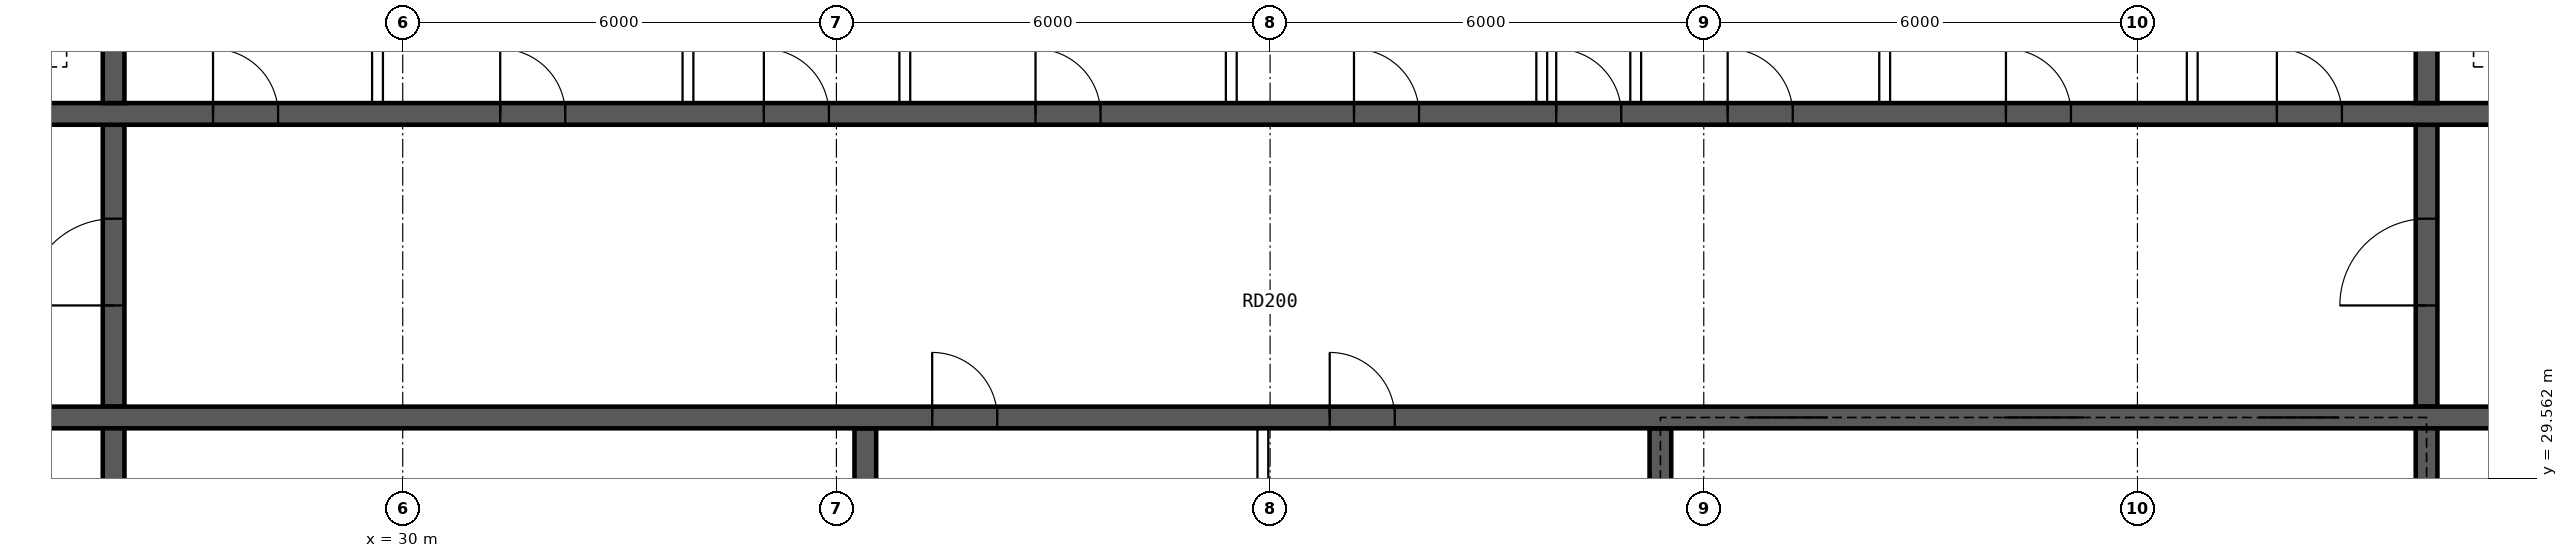
"""IFC4 building model, lengths in metres.
Left out: names, types, materials, properties, quantities, classifications, styles, units other than length and angle.
Written with IfcOpenShell. Run it as: python <this file> out.ifc"""

import sys

from ifc_helpers import new_model, si_unit, direction, frame, frame_2d, origin, place, context, subcontext, project, spatial, rectangle, extrude, element, fill, save


model = new_model("IFC4")
c1 = context("Model", 3, precision=1e-05, world=origin(), true_north=direction((0.0, 1.0)))
c2 = subcontext(c1, "Body", "Model", "MODEL_VIEW")
j1 = project(units=[si_unit("LENGTHUNIT", "METRE"), si_unit("PLANEANGLEUNIT", "RADIAN")], contexts=[c1])
p1 = place(None, origin())
s1 = spatial("IfcSite", under=j1, at=p1, CompositionType="ELEMENT")
p2 = place(p1, origin())
s2 = spatial("IfcBuilding", under=s1, at=p2, CompositionType="ELEMENT")
p3 = place(p2, frame((0.0, 0.0, 262.3)))
s3 = spatial("IfcBuildingStorey", under=s2, at=p3, CompositionType="ELEMENT", Elevation=262.3)
p4 = place(p3, frame((18.3, 30.4, 0.0), z_axis=(0.0, 0.0, 1.0), x_axis=(1.0, 0.0, 0.0)))
e1 = element("IfcWall", 1, at=p4, inside=s3, PredefinedType="SHEAR", context=c2, shape_type="SweptSolid", body=[
    extrude(rectangle(XDim=47.4, YDim=0.3, at=frame_2d((23.7, 0.0))), origin(), (0.0, 0.0, 1.0), 6.0),
])
p5 = place(p4, frame((0.4, 0.0, 0.0)))
e2 = element("IfcOpeningElement", 2, at=p5, cuts=e1, PredefinedType="OPENING", context=c2, shape_type="SweptSolid", body=[
    extrude(rectangle(XDim=1.0, YDim=2.1, at=frame_2d((0.5, 1.05))), frame((0.0, 0.16, 0.0), z_axis=(0.0, -1.0, 0.0), x_axis=(1.0, 0.0, 0.0)), (0.0, 0.0, 1.0), 0.32),
])
p6 = place(p4, frame((46.0, 0.0, 0.0)))
e3 = element("IfcOpeningElement", 3, at=p6, cuts=e1, PredefinedType="OPENING", context=c2, shape_type="SweptSolid", body=[
    extrude(rectangle(XDim=1.0, YDim=2.1, at=frame_2d((0.5, 1.05))), frame((0.0, 0.16, 0.0), z_axis=(0.0, -1.0, 0.0), x_axis=(1.0, 0.0, 0.0)), (0.0, 0.0, 1.0), 0.32),
])
p7 = place(p4, frame((19.025, 0.0, 0.0)))
e4 = element("IfcOpeningElement", 4, at=p7, cuts=e1, PredefinedType="OPENING", context=c2, shape_type="SweptSolid", body=[
    extrude(rectangle(XDim=0.9, YDim=2.1, at=frame_2d((0.45, 1.05))), frame((0.0, 0.16, 0.0), z_axis=(0.0, -1.0, 0.0), x_axis=(1.0, 0.0, 0.0)), (0.0, 0.0, 1.0), 0.32),
])
p8 = place(p4, frame((24.525, 0.0, 0.0)))
e5 = element("IfcOpeningElement", 5, at=p8, cuts=e1, PredefinedType="OPENING", context=c2, shape_type="SweptSolid", body=[
    extrude(rectangle(XDim=0.9, YDim=2.1, at=frame_2d((0.45, 1.05))), frame((0.0, 0.16, 0.0), z_axis=(0.0, -1.0, 0.0), x_axis=(1.0, 0.0, 0.0)), (0.0, 0.0, 1.0), 0.32),
])
p9 = place(p4, frame((30.317, 0.0, 0.0)))
e6 = element("IfcOpeningElement", 6, at=p9, cuts=e1, PredefinedType="OPENING", context=c2, shape_type="SweptSolid", body=[
    extrude(rectangle(XDim=1.1, YDim=2.1, at=frame_2d((0.55, 1.05))), frame((0.0, 0.16, 0.0), z_axis=(0.0, -1.0, 0.0), x_axis=(1.0, 0.0, 0.0)), (0.0, 0.0, 1.0), 0.32),
])
p10 = place(p4, frame((33.85, 0.0, 0.0)))
e7 = element("IfcOpeningElement", 7, at=p10, cuts=e1, PredefinedType="OPENING", context=c2, shape_type="SweptSolid", body=[
    extrude(rectangle(XDim=1.1, YDim=2.1, at=frame_2d((0.55, 1.05))), frame((0.0, 0.16, 0.0), z_axis=(0.0, -1.0, 0.0), x_axis=(1.0, 0.0, 0.0)), (0.0, 0.0, 1.0), 0.32),
])
p11 = place(p4, frame((37.383, 0.0, 0.0)))
e8 = element("IfcOpeningElement", 8, at=p11, cuts=e1, PredefinedType="OPENING", context=c2, shape_type="SweptSolid", body=[
    extrude(rectangle(XDim=1.1, YDim=2.1, at=frame_2d((0.55, 1.05))), frame((0.0, 0.16, 0.0), z_axis=(0.0, -1.0, 0.0), x_axis=(1.0, 0.0, 0.0)), (0.0, 0.0, 1.0), 0.32),
])
p12 = place(p3, frame((18.3, 34.6, 0.0), z_axis=(0.0, 0.0, 1.0), x_axis=(1.0, 0.0, 0.0)))
e9 = element("IfcWall", 9, at=p12, inside=s3, PredefinedType="SHEAR", context=c2, shape_type="SweptSolid", body=[
    extrude(rectangle(XDim=47.4, YDim=0.3, at=frame_2d((23.7, 0.0))), origin(), (0.0, 0.0, 1.0), 6.0),
])
p13 = place(p12, frame((0.9, 0.0, 0.0)))
e10 = element("IfcOpeningElement", 10, at=p13, cuts=e9, PredefinedType="OPENING", context=c2, shape_type="SweptSolid", body=[
    extrude(rectangle(XDim=1.1, YDim=2.1, at=frame_2d((0.55, 1.05))), frame((0.0, 0.16, 0.0), z_axis=(0.0, -1.0, 0.0), x_axis=(1.0, 0.0, 0.0)), (0.0, 0.0, 1.0), 0.32),
])
p14 = place(p12, frame((45.4, 0.0, 0.0)))
e11 = element("IfcOpeningElement", 11, at=p14, cuts=e9, PredefinedType="OPENING", context=c2, shape_type="SweptSolid", body=[
    extrude(rectangle(XDim=1.1, YDim=2.1, at=frame_2d((0.55, 1.05))), frame((0.0, 0.16, 0.0), z_axis=(0.0, -1.0, 0.0), x_axis=(1.0, 0.0, 0.0)), (0.0, 0.0, 1.0), 0.32),
])
p15 = place(p12, frame((4.3, 0.0, 0.0)))
e12 = element("IfcOpeningElement", 12, at=p15, cuts=e9, PredefinedType="OPENING", context=c2, shape_type="SweptSolid", body=[
    extrude(rectangle(XDim=0.9, YDim=2.1, at=frame_2d((0.45, 1.05))), frame((0.0, 0.16, 0.0), z_axis=(0.0, -1.0, 0.0), x_axis=(1.0, 0.0, 0.0)), (0.0, 0.0, 1.0), 0.32),
])
p16 = place(p12, frame((42.2, 0.0, 0.0)))
e13 = element("IfcOpeningElement", 13, at=p16, cuts=e9, PredefinedType="OPENING", context=c2, shape_type="SweptSolid", body=[
    extrude(rectangle(XDim=0.9, YDim=2.1, at=frame_2d((0.45, 1.05))), frame((0.0, 0.16, 0.0), z_axis=(0.0, -1.0, 0.0), x_axis=(1.0, 0.0, 0.0)), (0.0, 0.0, 1.0), 0.32),
])
p17 = place(p12, frame((9.075, 0.0, 0.0)))
e14 = element("IfcOpeningElement", 14, at=p17, cuts=e9, PredefinedType="OPENING", context=c2, shape_type="SweptSolid", body=[
    extrude(rectangle(XDim=0.9, YDim=2.1, at=frame_2d((0.45, 1.05))), frame((0.0, 0.16, 0.0), z_axis=(0.0, -1.0, 0.0), x_axis=(1.0, 0.0, 0.0)), (0.0, 0.0, 1.0), 0.32),
])
p18 = place(p12, frame((13.049, 0.0, 0.0)))
e15 = element("IfcOpeningElement", 15, at=p18, cuts=e9, PredefinedType="OPENING", context=c2, shape_type="SweptSolid", body=[
    extrude(rectangle(XDim=0.9, YDim=2.1, at=frame_2d((0.45, 1.05))), frame((0.0, 0.16, 0.0), z_axis=(0.0, -1.0, 0.0), x_axis=(1.0, 0.0, 0.0)), (0.0, 0.0, 1.0), 0.32),
])
p19 = place(p12, frame((16.696, 0.0, 0.0)))
e16 = element("IfcOpeningElement", 16, at=p19, cuts=e9, PredefinedType="OPENING", context=c2, shape_type="SweptSolid", body=[
    extrude(rectangle(XDim=0.9, YDim=2.1, at=frame_2d((0.45, 1.05))), frame((0.0, 0.16, 0.0), z_axis=(0.0, -1.0, 0.0), x_axis=(1.0, 0.0, 0.0)), (0.0, 0.0, 1.0), 0.32),
])
p20 = place(p12, frame((20.455, 0.0, 0.0)))
e17 = element("IfcOpeningElement", 17, at=p20, cuts=e9, PredefinedType="OPENING", context=c2, shape_type="SweptSolid", body=[
    extrude(rectangle(XDim=0.9, YDim=2.1, at=frame_2d((0.45, 1.05))), frame((0.0, 0.16, 0.0), z_axis=(0.0, -1.0, 0.0), x_axis=(1.0, 0.0, 0.0)), (0.0, 0.0, 1.0), 0.32),
])
p21 = place(p12, frame((24.861, 0.0, 0.0)))
e18 = element("IfcOpeningElement", 18, at=p21, cuts=e9, PredefinedType="OPENING", context=c2, shape_type="SweptSolid", body=[
    extrude(rectangle(XDim=0.9, YDim=2.1, at=frame_2d((0.45, 1.05))), frame((0.0, 0.16, 0.0), z_axis=(0.0, -1.0, 0.0), x_axis=(1.0, 0.0, 0.0)), (0.0, 0.0, 1.0), 0.32),
])
p22 = place(p12, frame((27.658, 0.0, 0.0)))
e19 = element("IfcOpeningElement", 19, at=p22, cuts=e9, PredefinedType="OPENING", context=c2, shape_type="SweptSolid", body=[
    extrude(rectangle(XDim=0.9, YDim=2.1, at=frame_2d((0.45, 1.05))), frame((0.0, 0.16, 0.0), z_axis=(0.0, -1.0, 0.0), x_axis=(1.0, 0.0, 0.0)), (0.0, 0.0, 1.0), 0.32),
])
p23 = place(p12, frame((30.031, 0.0, 0.0)))
e20 = element("IfcOpeningElement", 20, at=p23, cuts=e9, PredefinedType="OPENING", context=c2, shape_type="SweptSolid", body=[
    extrude(rectangle(XDim=0.9, YDim=2.1, at=frame_2d((0.45, 1.05))), frame((0.0, 0.16, 0.0), z_axis=(0.0, -1.0, 0.0), x_axis=(1.0, 0.0, 0.0)), (0.0, 0.0, 1.0), 0.32),
])
p24 = place(p12, frame((33.881, 0.0, 0.0)))
e21 = element("IfcOpeningElement", 21, at=p24, cuts=e9, PredefinedType="OPENING", context=c2, shape_type="SweptSolid", body=[
    extrude(rectangle(XDim=0.9, YDim=2.1, at=frame_2d((0.45, 1.05))), frame((0.0, 0.16, 0.0), z_axis=(0.0, -1.0, 0.0), x_axis=(1.0, 0.0, 0.0)), (0.0, 0.0, 1.0), 0.32),
])
p25 = place(p12, frame((37.629, 0.0, 0.0)))
e22 = element("IfcOpeningElement", 22, at=p25, cuts=e9, PredefinedType="OPENING", context=c2, shape_type="SweptSolid", body=[
    extrude(rectangle(XDim=0.9, YDim=2.1, at=frame_2d((0.45, 1.05))), frame((0.0, 0.16, 0.0), z_axis=(0.0, -1.0, 0.0), x_axis=(1.0, 0.0, 0.0)), (0.0, 0.0, 1.0), 0.32),
])
for number, where, z_axis, x_axis in (
    (23, (26.0, 26.1, 0.0), (0.0, 0.0, 1.0), (0.0, 1.0, 0.0)),
    (24, (58.0, 26.1, 0.0), (0.0, 0.0, 1.0), (0.0, 1.0, 0.0)),
):
    element("IfcWall", number, at=place(p3, frame(where, z_axis=z_axis, x_axis=x_axis)), inside=s3, PredefinedType="SHEAR", context=c2, shape_type="SweptSolid", body=[
        extrude(rectangle(XDim=4.15, YDim=0.3, at=frame_2d((2.075, 0.0))), origin(), (0.0, 0.0, 1.0), 6.0),
    ])
p26 = place(p3, frame((26.0, 30.55, 0.0), z_axis=(0.0, 0.0, 1.0), x_axis=(0.0, 1.0, 0.0)))
e25 = element("IfcWall", 25, at=p26, inside=s3, PredefinedType="SHEAR", context=c2, shape_type="SweptSolid", body=[
    extrude(rectangle(XDim=3.9, YDim=0.3, at=frame_2d((1.95, 0.0))), origin(), (0.0, 0.0, 1.0), 6.0),
])
p27 = place(p26, frame((1.4, 0.0, 0.0)))
e26 = element("IfcOpeningElement", 26, at=p27, cuts=e25, PredefinedType="OPENING", context=c2, shape_type="SweptSolid", body=[
    extrude(rectangle(XDim=1.2, YDim=2.1, at=frame_2d((0.6, 1.05))), frame((0.0, 0.16, 0.0), z_axis=(0.0, -1.0, 0.0), x_axis=(1.0, 0.0, 0.0)), (0.0, 0.0, 1.0), 0.32),
])
p28 = place(p3, frame((58.0, 30.55, 0.0), z_axis=(0.0, 0.0, 1.0), x_axis=(0.0, 1.0, 0.0)))
e27 = element("IfcWall", 27, at=p28, inside=s3, PredefinedType="SHEAR", context=c2, shape_type="SweptSolid", body=[
    extrude(rectangle(XDim=3.9, YDim=0.3, at=frame_2d((1.95, 0.0))), origin(), (0.0, 0.0, 1.0), 6.0),
])
p29 = place(p28, frame((1.4, 0.0, 0.0)))
e28 = element("IfcOpeningElement", 28, at=p29, cuts=e27, PredefinedType="OPENING", context=c2, shape_type="SweptSolid", body=[
    extrude(rectangle(XDim=1.2, YDim=2.1, at=frame_2d((0.6, 1.05))), frame((0.0, 0.16, 0.0), z_axis=(0.0, -1.0, 0.0), x_axis=(1.0, 0.0, 0.0)), (0.0, 0.0, 1.0), 0.32),
])
for number, where, z_axis, x_axis in (
    (29, (26.0, 34.75, 0.0), (0.0, 0.0, 1.0), (0.0, 1.0, 0.0)),
    (30, (58.0, 34.75, 0.0), (0.0, 0.0, 1.0), (0.0, 1.0, 0.0)),
):
    element("IfcWall", number, at=place(p3, frame(where, z_axis=z_axis, x_axis=x_axis)), inside=s3, PredefinedType="SHEAR", context=c2, shape_type="SweptSolid", body=[
        extrude(rectangle(XDim=3.15, YDim=0.3, at=frame_2d((1.575, 0.0))), origin(), (0.0, 0.0, 1.0), 6.0),
    ])
for number, where, z_axis, x_axis in (
    (31, (36.4, 26.1, 0.0), (0.0, 0.0, 1.0), (0.0, 1.0, 0.0)),
    (32, (47.4, 26.1, 0.0), (0.0, 0.0, 1.0), (0.0, 1.0, 0.0)),
):
    element("IfcWall", number, at=place(p3, frame(where, z_axis=z_axis, x_axis=x_axis)), inside=s3, PredefinedType="SHEAR", context=c2, shape_type="SweptSolid", body=[
        extrude(rectangle(XDim=4.15, YDim=0.3, at=frame_2d((2.075, 0.0))), origin(), (0.0, 0.0, 1.0), 6.0),
    ])
for number, where, z_axis, x_axis in (
    (33, (29.651, 34.75, 0.0), (0.0, 0.0, 1.0), (0.0, 1.0, 0.0)),
    (34, (33.946, 34.75, 0.0), (0.0, 0.0, 1.0), (0.0, 1.0, 0.0)),
    (35, (36.946, 34.75, 0.0), (0.0, 0.0, 1.0), (0.0, 1.0, 0.0)),
    (36, (41.463, 34.75, 0.0), (0.0, 0.0, 1.0), (0.0, 1.0, 0.0)),
    (37, (45.758, 34.75, 0.0), (0.0, 0.0, 1.0), (0.0, 1.0, 0.0)),
    (38, (47.058, 34.75, 0.0), (0.0, 0.0, 1.0), (0.0, 1.0, 0.0)),
    (39, (50.503, 34.75, 0.0), (0.0, 0.0, 1.0), (0.0, 1.0, 0.0)),
    (40, (54.758, 34.75, 0.0), (0.0, 0.0, 1.0), (0.0, 1.0, 0.0)),
):
    element("IfcWall", number, at=place(p3, frame(where, z_axis=z_axis, x_axis=x_axis)), inside=s3, PredefinedType="SOLIDWALL", context=c2, shape_type="SweptSolid", body=[
        extrude(rectangle(XDim=3.15, YDim=0.15, at=frame_2d((1.575, 0.0))), origin(), (0.0, 0.0, 1.0), 6.0),
    ])
p30 = place(p3, frame((41.9, 26.1, 0.0), z_axis=(0.0, 0.0, 1.0), x_axis=(0.0, 1.0, 0.0)))
e41 = element("IfcWall", 41, at=p30, inside=s3, PredefinedType="SOLIDWALL", context=c2, shape_type="SweptSolid", body=[
    extrude(rectangle(XDim=4.15, YDim=0.15, at=frame_2d((2.075, 0.0))), origin(), (0.0, 0.0, 1.0), 6.0),
])
p31 = place(p27, origin())
e42 = element("IfcDoor", 42, at=p31, inside=s3, OperationType="SINGLE_SWING_LEFT", PredefinedType="DOOR", context=c2, shape_type="SweptSolid", body=[
    extrude(rectangle(XDim=1.2, YDim=2.1, at=frame_2d((0.6, 1.05))), frame((0.0, 0.025, 0.0), z_axis=(0.0, -1.0, 0.0), x_axis=(1.0, 0.0, 0.0)), (0.0, 0.0, 1.0), 0.05),
])
fill(e26, e42)
p32 = place(p29, origin())
e43 = element("IfcDoor", 43, at=p32, inside=s3, OperationType="SINGLE_SWING_LEFT", PredefinedType="DOOR", context=c2, shape_type="SweptSolid", body=[
    extrude(rectangle(XDim=1.2, YDim=2.1, at=frame_2d((0.6, 1.05))), frame((0.0, 0.025, 0.0), z_axis=(0.0, -1.0, 0.0), x_axis=(1.0, 0.0, 0.0)), (0.0, 0.0, 1.0), 0.05),
])
fill(e28, e43)
p33 = place(p17, origin())
e44 = element("IfcDoor", 44, at=p33, inside=s3, OperationType="SINGLE_SWING_LEFT", PredefinedType="DOOR", context=c2, shape_type="SweptSolid", body=[
    extrude(rectangle(XDim=0.9, YDim=2.1, at=frame_2d((0.45, 1.05))), frame((0.0, 0.025, 0.0), z_axis=(0.0, -1.0, 0.0), x_axis=(1.0, 0.0, 0.0)), (0.0, 0.0, 1.0), 0.05),
])
fill(e14, e44)
p34 = place(p18, origin())
e45 = element("IfcDoor", 45, at=p34, inside=s3, OperationType="SINGLE_SWING_LEFT", PredefinedType="DOOR", context=c2, shape_type="SweptSolid", body=[
    extrude(rectangle(XDim=0.9, YDim=2.1, at=frame_2d((0.45, 1.05))), frame((0.0, 0.025, 0.0), z_axis=(0.0, -1.0, 0.0), x_axis=(1.0, 0.0, 0.0)), (0.0, 0.0, 1.0), 0.05),
])
fill(e15, e45)
p35 = place(p19, origin())
e46 = element("IfcDoor", 46, at=p35, inside=s3, OperationType="SINGLE_SWING_LEFT", PredefinedType="DOOR", context=c2, shape_type="SweptSolid", body=[
    extrude(rectangle(XDim=0.9, YDim=2.1, at=frame_2d((0.45, 1.05))), frame((0.0, 0.025, 0.0), z_axis=(0.0, -1.0, 0.0), x_axis=(1.0, 0.0, 0.0)), (0.0, 0.0, 1.0), 0.05),
])
fill(e16, e46)
p36 = place(p20, origin())
e47 = element("IfcDoor", 47, at=p36, inside=s3, OperationType="SINGLE_SWING_LEFT", PredefinedType="DOOR", context=c2, shape_type="SweptSolid", body=[
    extrude(rectangle(XDim=0.9, YDim=2.1, at=frame_2d((0.45, 1.05))), frame((0.0, 0.025, 0.0), z_axis=(0.0, -1.0, 0.0), x_axis=(1.0, 0.0, 0.0)), (0.0, 0.0, 1.0), 0.05),
])
fill(e17, e47)
p37 = place(p21, origin())
e48 = element("IfcDoor", 48, at=p37, inside=s3, OperationType="SINGLE_SWING_LEFT", PredefinedType="DOOR", context=c2, shape_type="SweptSolid", body=[
    extrude(rectangle(XDim=0.9, YDim=2.1, at=frame_2d((0.45, 1.05))), frame((0.0, 0.025, 0.0), z_axis=(0.0, -1.0, 0.0), x_axis=(1.0, 0.0, 0.0)), (0.0, 0.0, 1.0), 0.05),
])
fill(e18, e48)
p38 = place(p22, origin())
e49 = element("IfcDoor", 49, at=p38, inside=s3, OperationType="SINGLE_SWING_LEFT", PredefinedType="DOOR", context=c2, shape_type="SweptSolid", body=[
    extrude(rectangle(XDim=0.9, YDim=2.1, at=frame_2d((0.45, 1.05))), frame((0.0, 0.025, 0.0), z_axis=(0.0, -1.0, 0.0), x_axis=(1.0, 0.0, 0.0)), (0.0, 0.0, 1.0), 0.05),
])
fill(e19, e49)
p39 = place(p23, origin())
e50 = element("IfcDoor", 50, at=p39, inside=s3, OperationType="SINGLE_SWING_LEFT", PredefinedType="DOOR", context=c2, shape_type="SweptSolid", body=[
    extrude(rectangle(XDim=0.9, YDim=2.1, at=frame_2d((0.45, 1.05))), frame((0.0, 0.025, 0.0), z_axis=(0.0, -1.0, 0.0), x_axis=(1.0, 0.0, 0.0)), (0.0, 0.0, 1.0), 0.05),
])
fill(e20, e50)
p40 = place(p24, origin())
e51 = element("IfcDoor", 51, at=p40, inside=s3, OperationType="SINGLE_SWING_LEFT", PredefinedType="DOOR", context=c2, shape_type="SweptSolid", body=[
    extrude(rectangle(XDim=0.9, YDim=2.1, at=frame_2d((0.45, 1.05))), frame((0.0, 0.025, 0.0), z_axis=(0.0, -1.0, 0.0), x_axis=(1.0, 0.0, 0.0)), (0.0, 0.0, 1.0), 0.05),
])
fill(e21, e51)
p41 = place(p25, origin())
e52 = element("IfcDoor", 52, at=p41, inside=s3, OperationType="SINGLE_SWING_LEFT", PredefinedType="DOOR", context=c2, shape_type="SweptSolid", body=[
    extrude(rectangle(XDim=0.9, YDim=2.1, at=frame_2d((0.45, 1.05))), frame((0.0, 0.025, 0.0), z_axis=(0.0, -1.0, 0.0), x_axis=(1.0, 0.0, 0.0)), (0.0, 0.0, 1.0), 0.05),
])
fill(e22, e52)
p42 = place(p7, origin())
e53 = element("IfcDoor", 53, at=p42, inside=s3, OperationType="SINGLE_SWING_LEFT", PredefinedType="DOOR", context=c2, shape_type="SweptSolid", body=[
    extrude(rectangle(XDim=0.9, YDim=2.1, at=frame_2d((0.45, 1.05))), frame((0.0, 0.025, 0.0), z_axis=(0.0, -1.0, 0.0), x_axis=(1.0, 0.0, 0.0)), (0.0, 0.0, 1.0), 0.05),
])
fill(e4, e53)
p43 = place(p8, origin())
e54 = element("IfcDoor", 54, at=p43, inside=s3, OperationType="SINGLE_SWING_LEFT", PredefinedType="DOOR", context=c2, shape_type="SweptSolid", body=[
    extrude(rectangle(XDim=0.9, YDim=2.1, at=frame_2d((0.45, 1.05))), frame((0.0, 0.025, 0.0), z_axis=(0.0, -1.0, 0.0), x_axis=(1.0, 0.0, 0.0)), (0.0, 0.0, 1.0), 0.05),
])
fill(e5, e54)
p44 = place(p9, origin())
e55 = element("IfcDoor", 55, at=p44, inside=s3, OperationType="DOUBLE_DOOR_SLIDING", PredefinedType="DOOR", context=c2, shape_type="SweptSolid", body=[
    extrude(rectangle(XDim=1.1, YDim=2.1, at=frame_2d((0.55, 1.05))), frame((0.0, 0.025, 0.0), z_axis=(0.0, -1.0, 0.0), x_axis=(1.0, 0.0, 0.0)), (0.0, 0.0, 1.0), 0.05),
])
fill(e6, e55)
p45 = place(p10, origin())
e56 = element("IfcDoor", 56, at=p45, inside=s3, OperationType="DOUBLE_DOOR_SLIDING", PredefinedType="DOOR", context=c2, shape_type="SweptSolid", body=[
    extrude(rectangle(XDim=1.1, YDim=2.1, at=frame_2d((0.55, 1.05))), frame((0.0, 0.025, 0.0), z_axis=(0.0, -1.0, 0.0), x_axis=(1.0, 0.0, 0.0)), (0.0, 0.0, 1.0), 0.05),
])
fill(e7, e56)
p46 = place(p11, origin())
e57 = element("IfcDoor", 57, at=p46, inside=s3, OperationType="DOUBLE_DOOR_SLIDING", PredefinedType="DOOR", context=c2, shape_type="SweptSolid", body=[
    extrude(rectangle(XDim=1.1, YDim=2.1, at=frame_2d((0.55, 1.05))), frame((0.0, 0.025, 0.0), z_axis=(0.0, -1.0, 0.0), x_axis=(1.0, 0.0, 0.0)), (0.0, 0.0, 1.0), 0.05),
])
fill(e8, e57)
save(model, sys.argv[1])
